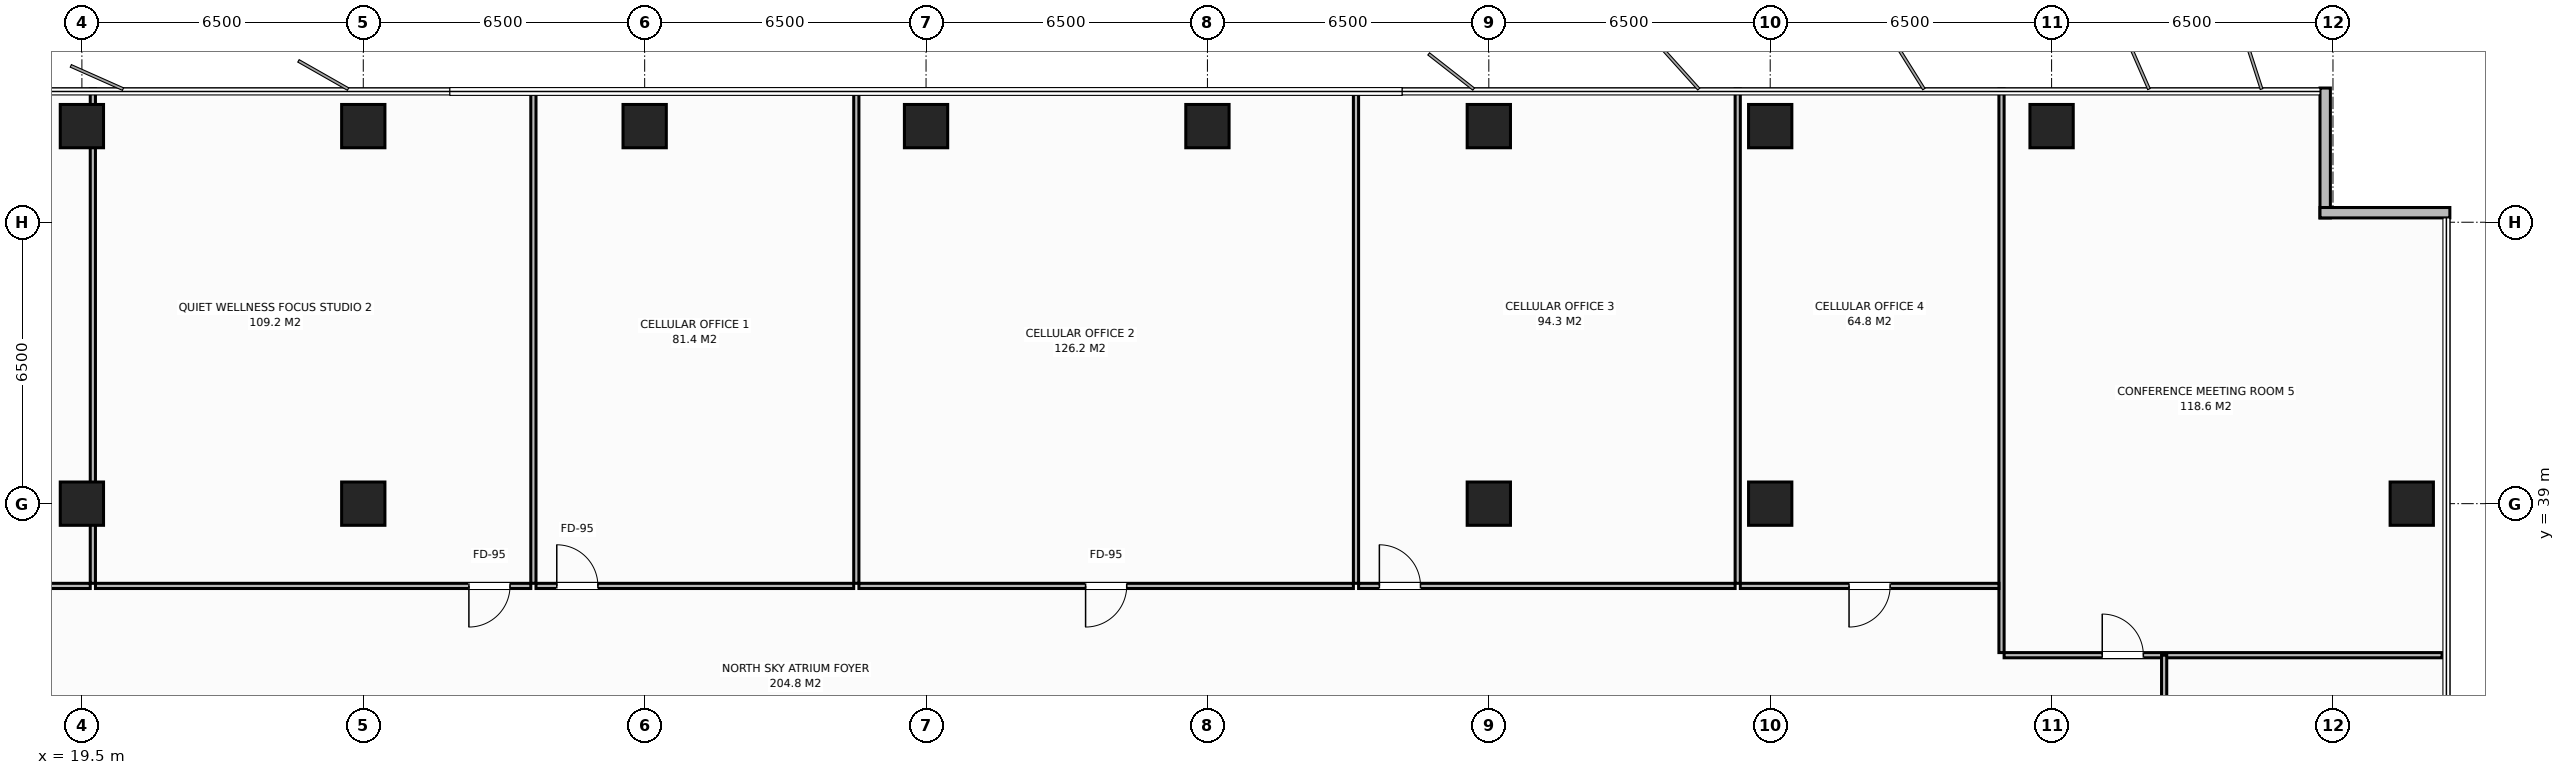
"""IFC4 building model, lengths in metres.
Left out: names, types, materials, properties, quantities, classifications, styles, units other than length and angle.
Written with IfcOpenShell. Run it as: python <this file> out.ifc"""

import sys

from ifc_helpers import new_model, si_unit, direction, frame, frame_2d, origin, origin_2d, place, context, subcontext, project, spatial, rectangle, extrude, element, fill, save


model = new_model("IFC4")
c1 = context("Model", 3, precision=1e-05, world=origin(), true_north=direction((0.0, 1.0)))
c2 = subcontext(c1, "Body", "Model", "MODEL_VIEW")
j1 = project(units=[si_unit("LENGTHUNIT", "METRE"), si_unit("PLANEANGLEUNIT", "RADIAN")], contexts=[c1])
p1 = place(None, origin())
s1 = spatial("IfcSite", under=j1, at=p1, CompositionType="ELEMENT")
p2 = place(p1, origin())
s2 = spatial("IfcBuilding", under=s1, at=p2, CompositionType="ELEMENT")
p3 = place(p2, frame((0.0, 0.0, 178.4)))
s3 = spatial("IfcBuildingStorey", under=s2, at=p3, CompositionType="ELEMENT", Elevation=178.4)
for number, where, z_axis, x_axis in (
    (1, (19.5, 39.0, 0.0), (0.0, 0.0, 1.0), (1.0, 0.0, 0.0)),
    (2, (58.5, 39.0, 0.0), (0.0, 0.0, 1.0), (1.0, 0.0, 0.0)),
    (3, (26.0, 39.0, 0.0), (0.0, 0.0, 1.0), (1.0, 0.0, 0.0)),
    (4, (52.0, 39.0, 0.0), (0.0, 0.0, 1.0), (1.0, 0.0, 0.0)),
    (5, (19.5, 47.72, 0.0), (0.0, 0.0, 1.0), (1.0, 0.0, 0.0)),
    (6, (26.0, 47.72, 0.0), (0.0, 0.0, 1.0), (1.0, 0.0, 0.0)),
    (7, (32.5, 47.72, 0.0), (0.0, 0.0, 1.0), (1.0, 0.0, 0.0)),
    (8, (39.0, 47.72, 0.0), (0.0, 0.0, 1.0), (1.0, 0.0, 0.0)),
    (9, (45.5, 47.72, 0.0), (0.0, 0.0, 1.0), (1.0, 0.0, 0.0)),
    (10, (52.0, 47.72, 0.0), (0.0, 0.0, 1.0), (1.0, 0.0, 0.0)),
    (11, (58.5, 47.72, 0.0), (0.0, 0.0, 1.0), (1.0, 0.0, 0.0)),
    (12, (65.0, 47.72, 0.0), (0.0, 0.0, 1.0), (1.0, 0.0, 0.0)),
    (13, (73.32, 39.0, 0.0), (0.0, 0.0, 1.0), (1.0, 0.0, 0.0)),
):
    element("IfcColumn", number, at=place(p3, frame(where, z_axis=z_axis, x_axis=x_axis)), inside=s3, PredefinedType="COLUMN", context=c2, shape_type="SweptSolid", body=[
        extrude(rectangle(XDim=1.0, YDim=1.0, at=origin_2d()), origin(), (0.0, 0.0, 1.0), 3.8),
    ])
for number, where, z_axis, x_axis in (
    (14, (71.32, 48.6, 0.0), (0.0, 0.0, 1.0), (0.0, -1.0, 0.0)),
    (15, (71.2, 45.72, 0.0), (0.0, 0.0, 1.0), (1.0, 0.0, 0.0)),
):
    element("IfcWall", number, at=place(p3, frame(where, z_axis=z_axis, x_axis=x_axis)), inside=s3, PredefinedType="STANDARD", context=c2, shape_type="SweptSolid", body=[
        extrude(rectangle(XDim=3.0, YDim=0.24, at=frame_2d((1.5, 0.0))), origin(), (0.0, 0.0, 1.0), 3.572),
    ])
p4 = place(p3, frame((19.753, 37.16, 0.0), z_axis=(0.0, 0.0, 1.0), x_axis=(0.0, 1.0, 0.0)))
e16 = element("IfcWall", 16, at=p4, inside=s3, PredefinedType="PARTITIONING", context=c2, shape_type="SweptSolid", body=[
    extrude(rectangle(XDim=11.42, YDim=0.12, at=frame_2d((5.71, 0.0))), origin(), (0.0, 0.0, 1.0), 3.572),
])
p5 = place(p3, frame((13.719, 37.1, 0.0), z_axis=(0.0, 0.0, 1.0), x_axis=(1.0, 0.0, 0.0)))
e17 = element("IfcWall", 17, at=p5, inside=s3, PredefinedType="PARTITIONING", context=c2, shape_type="SweptSolid", body=[
    extrude(rectangle(XDim=5.974, YDim=0.12, at=frame_2d((2.987, 0.0))), origin(), (0.0, 0.0, 1.0), 3.572),
])
p6 = place(p5, frame((2.512, 0.0, 0.0)))
e18 = element("IfcOpeningElement", 18, at=p6, cuts=e17, PredefinedType="OPENING", context=c2, shape_type="SweptSolid", body=[
    extrude(rectangle(XDim=0.95, YDim=2.15, at=frame_2d((0.475, 1.075))), frame((0.0, 0.07, 0.0), z_axis=(0.0, -1.0, 0.0), x_axis=(1.0, 0.0, 0.0)), (0.0, 0.0, 1.0), 0.14),
])
p7 = place(p3, frame((29.93, 37.16, 0.0), z_axis=(0.0, 0.0, 1.0), x_axis=(0.0, 1.0, 0.0)))
e19 = element("IfcWall", 19, at=p7, inside=s3, PredefinedType="PARTITIONING", context=c2, shape_type="SweptSolid", body=[
    extrude(rectangle(XDim=11.42, YDim=0.12, at=frame_2d((5.71, 0.0))), origin(), (0.0, 0.0, 1.0), 3.572),
])
p8 = place(p3, frame((19.813, 37.1, 0.0), z_axis=(0.0, 0.0, 1.0), x_axis=(1.0, 0.0, 0.0)))
e20 = element("IfcWall", 20, at=p8, inside=s3, PredefinedType="PARTITIONING", context=c2, shape_type="SweptSolid", body=[
    extrude(rectangle(XDim=10.057, YDim=0.12, at=frame_2d((5.028, 0.0))), origin(), (0.0, 0.0, 1.0), 3.572),
])
p9 = place(p8, frame((8.627, 0.0, 0.0)))
e21 = element("IfcOpeningElement", 21, at=p9, cuts=e20, PredefinedType="OPENING", context=c2, shape_type="SweptSolid", body=[
    extrude(rectangle(XDim=0.95, YDim=2.15, at=frame_2d((0.475, 1.075))), frame((0.0, 0.07, 0.0), z_axis=(0.0, -1.0, 0.0), x_axis=(1.0, 0.0, 0.0)), (0.0, 0.0, 1.0), 0.14),
])
p10 = place(p3, frame((37.389, 37.16, 0.0), z_axis=(0.0, 0.0, 1.0), x_axis=(0.0, 1.0, 0.0)))
e22 = element("IfcWall", 22, at=p10, inside=s3, PredefinedType="PARTITIONING", context=c2, shape_type="SweptSolid", body=[
    extrude(rectangle(XDim=11.42, YDim=0.12, at=frame_2d((5.71, 0.0))), origin(), (0.0, 0.0, 1.0), 3.572),
])
p11 = place(p3, frame((29.99, 37.1, 0.0), z_axis=(0.0, 0.0, 1.0), x_axis=(1.0, 0.0, 0.0)))
e23 = element("IfcWall", 23, at=p11, inside=s3, PredefinedType="PARTITIONING", context=c2, shape_type="SweptSolid", body=[
    extrude(rectangle(XDim=7.339, YDim=0.12, at=frame_2d((3.67, 0.0))), origin(), (0.0, 0.0, 1.0), 3.572),
])
p12 = place(p11, frame((0.48, 0.0, 0.0)))
e24 = element("IfcOpeningElement", 24, at=p12, cuts=e23, PredefinedType="OPENING", context=c2, shape_type="SweptSolid", body=[
    extrude(rectangle(XDim=0.95, YDim=2.15, at=frame_2d((0.475, 1.075))), frame((0.0, 0.07, 0.0), z_axis=(0.0, -1.0, 0.0), x_axis=(1.0, 0.0, 0.0)), (0.0, 0.0, 1.0), 0.14),
])
p13 = place(p3, frame((48.932, 37.16, 0.0), z_axis=(0.0, 0.0, 1.0), x_axis=(0.0, 1.0, 0.0)))
e25 = element("IfcWall", 25, at=p13, inside=s3, PredefinedType="PARTITIONING", context=c2, shape_type="SweptSolid", body=[
    extrude(rectangle(XDim=11.42, YDim=0.12, at=frame_2d((5.71, 0.0))), origin(), (0.0, 0.0, 1.0), 3.572),
])
p14 = place(p3, frame((37.449, 37.1, 0.0), z_axis=(0.0, 0.0, 1.0), x_axis=(1.0, 0.0, 0.0)))
e26 = element("IfcWall", 26, at=p14, inside=s3, PredefinedType="PARTITIONING", context=c2, shape_type="SweptSolid", body=[
    extrude(rectangle(XDim=11.422, YDim=0.12, at=frame_2d((5.711, 0.0))), origin(), (0.0, 0.0, 1.0), 3.572),
])
p15 = place(p14, frame((5.236, 0.0, 0.0)))
e27 = element("IfcOpeningElement", 27, at=p15, cuts=e26, PredefinedType="OPENING", context=c2, shape_type="SweptSolid", body=[
    extrude(rectangle(XDim=0.95, YDim=2.15, at=frame_2d((0.475, 1.075))), frame((0.0, 0.07, 0.0), z_axis=(0.0, -1.0, 0.0), x_axis=(1.0, 0.0, 0.0)), (0.0, 0.0, 1.0), 0.14),
])
p16 = place(p3, frame((57.75, 37.16, 0.0), z_axis=(0.0, 0.0, 1.0), x_axis=(0.0, 1.0, 0.0)))
e28 = element("IfcWall", 28, at=p16, inside=s3, PredefinedType="PARTITIONING", context=c2, shape_type="SweptSolid", body=[
    extrude(rectangle(XDim=11.42, YDim=0.12, at=frame_2d((5.71, 0.0))), origin(), (0.0, 0.0, 1.0), 3.572),
])
p17 = place(p3, frame((48.992, 37.1, 0.0), z_axis=(0.0, 0.0, 1.0), x_axis=(1.0, 0.0, 0.0)))
e29 = element("IfcWall", 29, at=p17, inside=s3, PredefinedType="PARTITIONING", context=c2, shape_type="SweptSolid", body=[
    extrude(rectangle(XDim=8.698, YDim=0.12, at=frame_2d((4.349, 0.0))), origin(), (0.0, 0.0, 1.0), 3.572),
])
p18 = place(p17, frame((0.48, 0.0, 0.0)))
e30 = element("IfcOpeningElement", 30, at=p18, cuts=e29, PredefinedType="OPENING", context=c2, shape_type="SweptSolid", body=[
    extrude(rectangle(XDim=0.95, YDim=2.15, at=frame_2d((0.475, 1.075))), frame((0.0, 0.07, 0.0), z_axis=(0.0, -1.0, 0.0), x_axis=(1.0, 0.0, 0.0)), (0.0, 0.0, 1.0), 0.14),
])
p19 = place(p3, frame((63.843, 35.56, 0.0), z_axis=(0.0, 0.0, 1.0), x_axis=(0.0, 1.0, 0.0)))
e31 = element("IfcWall", 31, at=p19, inside=s3, PredefinedType="PARTITIONING", context=c2, shape_type="SweptSolid", body=[
    extrude(rectangle(XDim=13.02, YDim=0.12, at=frame_2d((6.51, 0.0))), origin(), (0.0, 0.0, 1.0), 3.572),
])
p20 = place(p3, frame((57.81, 37.1, 0.0), z_axis=(0.0, 0.0, 1.0), x_axis=(1.0, 0.0, 0.0)))
e32 = element("IfcWall", 32, at=p20, inside=s3, PredefinedType="PARTITIONING", context=c2, shape_type="SweptSolid", body=[
    extrude(rectangle(XDim=5.973, YDim=0.12, at=frame_2d((2.987, 0.0))), origin(), (0.0, 0.0, 1.0), 3.572),
])
p21 = place(p20, frame((2.512, 0.0, 0.0)))
e33 = element("IfcOpeningElement", 33, at=p21, cuts=e32, PredefinedType="OPENING", context=c2, shape_type="SweptSolid", body=[
    extrude(rectangle(XDim=0.95, YDim=2.15, at=frame_2d((0.475, 1.075))), frame((0.0, 0.07, 0.0), z_axis=(0.0, -1.0, 0.0), x_axis=(1.0, 0.0, 0.0)), (0.0, 0.0, 1.0), 0.14),
])
p22 = place(p3, frame((63.903, 35.5, 0.0), z_axis=(0.0, 0.0, 1.0), x_axis=(1.0, 0.0, 0.0)))
e34 = element("IfcWall", 34, at=p22, inside=s3, PredefinedType="PARTITIONING", context=c2, shape_type="SweptSolid", body=[
    extrude(rectangle(XDim=10.117, YDim=0.12, at=frame_2d((5.058, 0.0))), origin(), (0.0, 0.0, 1.0), 3.572),
])
p23 = place(p22, frame((2.267, 0.0, 0.0)))
e35 = element("IfcOpeningElement", 35, at=p23, cuts=e34, PredefinedType="OPENING", context=c2, shape_type="SweptSolid", body=[
    extrude(rectangle(XDim=0.95, YDim=2.15, at=frame_2d((0.475, 1.075))), frame((0.0, 0.07, 0.0), z_axis=(0.0, -1.0, 0.0), x_axis=(1.0, 0.0, 0.0)), (0.0, 0.0, 1.0), 0.14),
])
p24 = place(p3, frame((67.6, 16.5, 0.0), z_axis=(0.0, 0.0, 1.0), x_axis=(0.0, 1.0, 0.0)))
e36 = element("IfcWall", 36, at=p24, inside=s3, PredefinedType="PARTITIONING", context=c2, shape_type="SweptSolid", body=[
    extrude(rectangle(XDim=19.0, YDim=0.12, at=frame_2d((9.5, 0.0))), origin(), (0.0, 0.0, 1.0), 3.572),
])
p25 = place(p24, frame((9.025, 0.0, 0.0)))
e37 = element("IfcOpeningElement", 37, at=p25, cuts=e36, PredefinedType="OPENING", context=c2, shape_type="SweptSolid", body=[
    extrude(rectangle(XDim=0.95, YDim=2.15, at=frame_2d((0.475, 1.075))), frame((0.0, 0.07, 0.0), z_axis=(0.0, -1.0, 0.0), x_axis=(1.0, 0.0, 0.0)), (0.0, 0.0, 1.0), 0.14),
])
p26 = place(p9, origin())
e38 = element("IfcDoor", 38, at=p26, inside=s3, OperationType="SINGLE_SWING_RIGHT", PredefinedType="DOOR", context=c2, shape_type="SweptSolid", body=[
    extrude(rectangle(XDim=0.95, YDim=2.15, at=frame_2d((0.475, 1.075))), frame((0.0, 0.025, 0.0), z_axis=(0.0, -1.0, 0.0), x_axis=(1.0, 0.0, 0.0)), (0.0, 0.0, 1.0), 0.05),
])
fill(e21, e38)
p27 = place(p12, origin())
e39 = element("IfcDoor", 39, at=p27, inside=s3, OperationType="SINGLE_SWING_LEFT", PredefinedType="DOOR", context=c2, shape_type="SweptSolid", body=[
    extrude(rectangle(XDim=0.95, YDim=2.15, at=frame_2d((0.475, 1.075))), frame((0.0, 0.025, 0.0), z_axis=(0.0, -1.0, 0.0), x_axis=(1.0, 0.0, 0.0)), (0.0, 0.0, 1.0), 0.05),
])
fill(e24, e39)
p28 = place(p15, origin())
e40 = element("IfcDoor", 40, at=p28, inside=s3, OperationType="SINGLE_SWING_RIGHT", PredefinedType="DOOR", context=c2, shape_type="SweptSolid", body=[
    extrude(rectangle(XDim=0.95, YDim=2.15, at=frame_2d((0.475, 1.075))), frame((0.0, 0.025, 0.0), z_axis=(0.0, -1.0, 0.0), x_axis=(1.0, 0.0, 0.0)), (0.0, 0.0, 1.0), 0.05),
])
fill(e27, e40)
p29 = place(p18, origin())
e41 = element("IfcDoor", 41, at=p29, inside=s3, OperationType="SINGLE_SWING_LEFT", PredefinedType="DOOR", context=c2, shape_type="SweptSolid", body=[
    extrude(rectangle(XDim=0.95, YDim=2.15, at=frame_2d((0.475, 1.075))), frame((0.0, 0.025, 0.0), z_axis=(0.0, -1.0, 0.0), x_axis=(1.0, 0.0, 0.0)), (0.0, 0.0, 1.0), 0.05),
])
fill(e30, e41)
p30 = place(p21, origin())
e42 = element("IfcDoor", 42, at=p30, inside=s3, OperationType="SINGLE_SWING_RIGHT", PredefinedType="DOOR", context=c2, shape_type="SweptSolid", body=[
    extrude(rectangle(XDim=0.95, YDim=2.15, at=frame_2d((0.475, 1.075))), frame((0.0, 0.025, 0.0), z_axis=(0.0, -1.0, 0.0), x_axis=(1.0, 0.0, 0.0)), (0.0, 0.0, 1.0), 0.05),
])
fill(e33, e42)
p31 = place(p23, origin())
e43 = element("IfcDoor", 43, at=p31, inside=s3, OperationType="SINGLE_SWING_LEFT", PredefinedType="DOOR", context=c2, shape_type="SweptSolid", body=[
    extrude(rectangle(XDim=0.95, YDim=2.15, at=frame_2d((0.475, 1.075))), frame((0.0, 0.025, 0.0), z_axis=(0.0, -1.0, 0.0), x_axis=(1.0, 0.0, 0.0)), (0.0, 0.0, 1.0), 0.05),
])
fill(e35, e43)
save(model, sys.argv[1])
